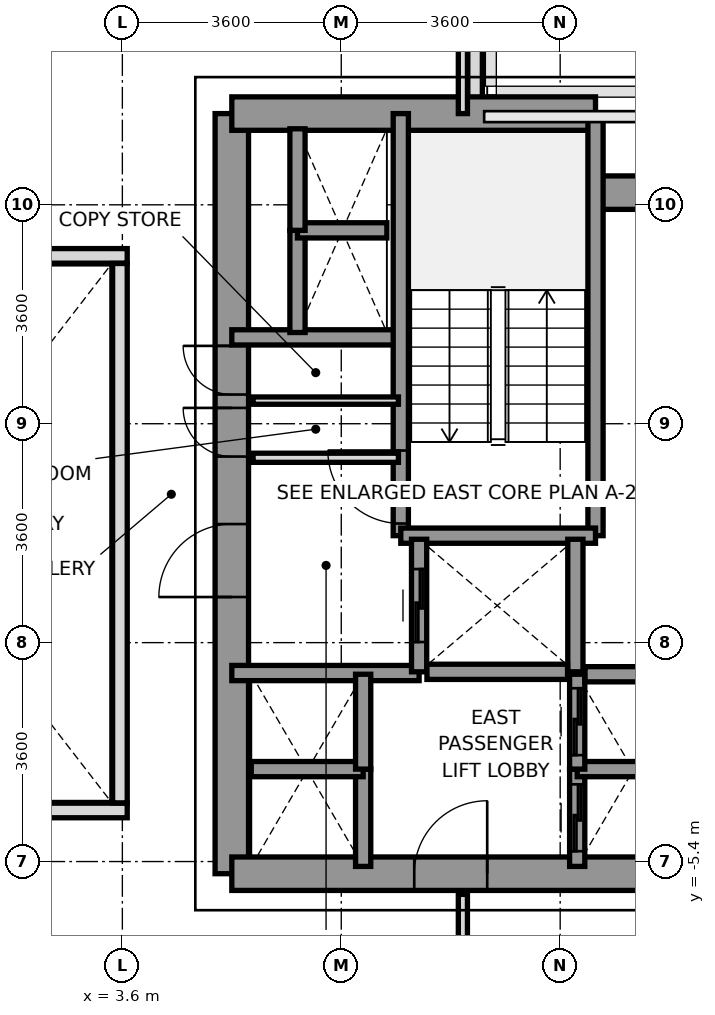
"""IFC4 building model, lengths in metres.
Left out: names, types, materials, properties, quantities, classifications, styles, units other than length and angle.
Written with IfcOpenShell. Run it as: python <this file> out.ifc"""

import sys

from ifc_helpers import new_model, si_unit, direction, frame, frame_2d, origin, place, context, subcontext, project, spatial, rectangle, extrude, source, transform, mapped, element, fill, save


model = new_model("IFC4")
c1 = context("Model", 3, precision=1e-05, world=origin(), true_north=direction((0.0, 1.0)))
c2 = subcontext(c1, "Body", "Model", "MODEL_VIEW")
j1 = project(units=[si_unit("LENGTHUNIT", "METRE"), si_unit("PLANEANGLEUNIT", "RADIAN")], contexts=[c1])
p1 = place(None, origin())
s1 = spatial("IfcSite", under=j1, at=p1, CompositionType="ELEMENT")
p2 = place(p1, origin())
s2 = spatial("IfcBuilding", under=s1, at=p2, CompositionType="ELEMENT")
p3 = place(p2, frame((0.0, 0.0, 51.0)))
s3 = spatial("IfcBuildingStorey", under=s2, at=p3, CompositionType="ELEMENT", Elevation=51.0)
p4 = place(p3, frame((9.4, 8.397, 0.0), z_axis=(0.0, 0.0, 1.0), x_axis=(0.0, -1.0, 0.0)))
e1 = element("IfcWall", 1, at=p4, inside=s3, PredefinedType="PARAPET", context=c2, shape_type="SweptSolid", body=[
    extrude(rectangle(XDim=1.444, YDim=0.24, at=frame_2d((0.722, 0.0))), origin(), (0.0, 0.0, 1.0), 1.15),
])
p5 = place(p3, frame((5.4, -5.6, 0.0), z_axis=(0.0, 0.0, 1.0), x_axis=(0.0, 1.0, 0.0)))
e2 = element("IfcWall", 2, at=p5, inside=s3, PredefinedType="SHEAR", context=c2, shape_type="SweptSolid", body=[
    extrude(rectangle(XDim=12.5, YDim=0.55, at=frame_2d((6.25, 0.0))), origin(), (0.0, 0.0, 1.0), 3.2),
])
p6 = place(p5, frame((4.55, 0.0, 0.0)))
e3 = element("IfcOpeningElement", 3, at=p6, cuts=e2, PredefinedType="OPENING", context=c2, shape_type="SweptSolid", body=[
    extrude(rectangle(XDim=1.2, YDim=2.2, at=frame_2d((0.6, 1.1))), frame((0.0, 0.285, 0.0), z_axis=(0.0, -1.0, 0.0), x_axis=(1.0, 0.0, 0.0)), (0.0, 0.0, 1.0), 0.57),
])
p7 = place(p5, frame((6.86, 0.0, 0.0)))
e4 = element("IfcOpeningElement", 4, at=p7, cuts=e2, PredefinedType="OPENING", context=c2, shape_type="SweptSolid", body=[
    extrude(rectangle(XDim=0.8, YDim=2.1, at=frame_2d((0.4, 1.05))), frame((0.0, 0.285, 0.0), z_axis=(0.0, -1.0, 0.0), x_axis=(1.0, 0.0, 0.0)), (0.0, 0.0, 1.0), 0.57),
])
p8 = place(p5, frame((7.88, 0.0, 0.0)))
e5 = element("IfcOpeningElement", 5, at=p8, cuts=e2, PredefinedType="OPENING", context=c2, shape_type="SweptSolid", body=[
    extrude(rectangle(XDim=0.8, YDim=2.1, at=frame_2d((0.4, 1.05))), frame((0.0, 0.285, 0.0), z_axis=(0.0, -1.0, 0.0), x_axis=(1.0, 0.0, 0.0)), (0.0, 0.0, 1.0), 0.57),
])
p9 = place(p3, frame((5.4, 6.9, 0.0), z_axis=(0.0, 0.0, 1.0), x_axis=(1.0, 0.0, 0.0)))
e6 = element("IfcWall", 6, at=p9, inside=s3, PredefinedType="SHEAR", context=c2, shape_type="SweptSolid", body=[
    extrude(rectangle(XDim=5.981, YDim=0.55, at=frame_2d((2.991, 0.0))), origin(), (0.0, 0.0, 1.0), 3.2),
])
p10 = place(p3, frame((11.381, 5.6, 0.0), z_axis=(0.0, 0.0, 1.0), x_axis=(1.0, 0.0, 0.0)))
e7 = element("IfcWall", 7, at=p10, inside=s3, PredefinedType="SHEAR", context=c2, shape_type="SweptSolid", body=[
    extrude(rectangle(XDim=1.819, YDim=0.55, at=frame_2d((0.909, 0.0))), origin(), (0.0, 0.0, 1.0), 3.2),
])
p11 = place(p3, frame((5.4, -5.6, 0.0), z_axis=(0.0, 0.0, 1.0), x_axis=(1.0, 0.0, 0.0)))
e8 = element("IfcWall", 8, at=p11, inside=s3, PredefinedType="SHEAR", context=c2, shape_type="SweptSolid", body=[
    extrude(rectangle(XDim=7.8, YDim=0.55, at=frame_2d((3.9, 0.0))), origin(), (0.0, 0.0, 1.0), 3.2),
])
p12 = place(p11, frame((3.0, 0.0, 0.0)))
e9 = element("IfcOpeningElement", 9, at=p12, cuts=e8, PredefinedType="OPENING", context=c2, shape_type="SweptSolid", body=[
    extrude(rectangle(XDim=1.2, YDim=2.2, at=frame_2d((0.6, 1.1))), frame((0.0, 0.285, 0.0), z_axis=(0.0, -1.0, 0.0), x_axis=(1.0, 0.0, 0.0)), (0.0, 0.0, 1.0), 0.57),
])
p13 = place(p3, frame((5.4, 3.22, 0.0), z_axis=(0.0, 0.0, 1.0), x_axis=(1.0, 0.0, 0.0)))
e10 = element("IfcWall", 10, at=p13, inside=s3, PredefinedType="SOLIDWALL", context=c2, shape_type="SweptSolid", body=[
    extrude(rectangle(XDim=2.78, YDim=0.25, at=frame_2d((1.39, 0.0))), origin(), (0.0, 0.0, 1.0), 3.2),
])
p14 = place(p3, frame((5.4, -2.3, 0.0), z_axis=(0.0, 0.0, 1.0), x_axis=(1.0, 0.0, 0.0)))
e11 = element("IfcWall", 11, at=p14, inside=s3, PredefinedType="SOLIDWALL", context=c2, shape_type="SweptSolid", body=[
    extrude(rectangle(XDim=3.08, YDim=0.25, at=frame_2d((1.54, 0.0))), origin(), (0.0, 0.0, 1.0), 3.2),
])
p15 = place(p3, frame((8.179, -0.041, 0.0), z_axis=(0.0, 0.0, 1.0), x_axis=(0.0, 1.0, 0.0)))
e12 = element("IfcWall", 12, at=p15, inside=s3, PredefinedType="SOLIDWALL", context=c2, shape_type="SweptSolid", body=[
    extrude(rectangle(XDim=6.941, YDim=0.25, at=frame_2d((3.47, 0.0))), origin(), (0.0, 0.0, 1.0), 3.2),
])
p16 = place(p15, frame((0.2, 0.0, 0.0)))
e13 = element("IfcOpeningElement", 13, at=p16, cuts=e12, PredefinedType="OPENING", context=c2, shape_type="SweptSolid", body=[
    extrude(rectangle(XDim=1.2, YDim=2.2, at=frame_2d((0.6, 1.1))), frame((0.0, 0.135, 0.0), z_axis=(0.0, -1.0, 0.0), x_axis=(1.0, 0.0, 0.0)), (0.0, 0.0, 1.0), 0.27),
])
p17 = place(p3, frame((11.381, -0.041, 0.0), z_axis=(0.0, 0.0, 1.0), x_axis=(0.0, 1.0, 0.0)))
e14 = element("IfcWall", 14, at=p17, inside=s3, PredefinedType="SOLIDWALL", context=c2, shape_type="SweptSolid", body=[
    extrude(rectangle(XDim=6.941, YDim=0.25, at=frame_2d((3.47, 0.0))), origin(), (0.0, 0.0, 1.0), 3.2),
])
p18 = place(p3, frame((8.179, -0.041, 0.0), z_axis=(0.0, 0.0, 1.0), x_axis=(1.0, 0.0, 0.0)))
e15 = element("IfcWall", 15, at=p18, inside=s3, PredefinedType="SOLIDWALL", context=c2, shape_type="SweptSolid", body=[
    extrude(rectangle(XDim=3.202, YDim=0.25, at=frame_2d((1.601, 0.0))), origin(), (0.0, 0.0, 1.0), 3.2),
])
p19 = place(p3, frame((8.48, -2.28, 0.0), z_axis=(0.0, 0.0, 1.0), x_axis=(0.0, 1.0, 0.0)))
e16 = element("IfcWall", 16, at=p19, inside=s3, PredefinedType="SOLIDWALL", context=c2, shape_type="SweptSolid", body=[
    extrude(rectangle(XDim=2.18, YDim=0.25, at=frame_2d((1.09, 0.0))), origin(), (0.0, 0.0, 1.0), 3.2),
])
p20 = place(p19, frame((0.49, 0.0, 0.0)))
e17 = element("IfcOpeningElement", 17, at=p20, cuts=e16, PredefinedType="OPENING", context=c2, shape_type="SweptSolid", body=[
    extrude(rectangle(XDim=1.2, YDim=2.2, at=frame_2d((0.6, 1.1))), frame((0.0, 0.135, 0.0), z_axis=(0.0, -1.0, 0.0), x_axis=(1.0, 0.0, 0.0)), (0.0, 0.0, 1.0), 0.27),
])
p21 = place(p3, frame((11.05, -2.28, 0.0), z_axis=(0.0, 0.0, 1.0), x_axis=(0.0, 1.0, 0.0)))
e18 = element("IfcWall", 18, at=p21, inside=s3, PredefinedType="SOLIDWALL", context=c2, shape_type="SweptSolid", body=[
    extrude(rectangle(XDim=2.18, YDim=0.25, at=frame_2d((1.09, 0.0))), origin(), (0.0, 0.0, 1.0), 3.2),
])
p22 = place(p3, frame((8.609, -2.28, 0.0), z_axis=(0.0, 0.0, 1.0), x_axis=(1.0, 0.0, 0.0)))
e19 = element("IfcWall", 19, at=p22, inside=s3, PredefinedType="SOLIDWALL", context=c2, shape_type="SweptSolid", body=[
    extrude(rectangle(XDim=2.312, YDim=0.25, at=frame_2d((1.156, 0.0))), origin(), (0.0, 0.0, 1.0), 3.2),
])
p23 = place(p3, frame((11.08, -5.48, 0.0), z_axis=(0.0, 0.0, 1.0), x_axis=(0.0, 1.0, 0.0)))
e20 = element("IfcWall", 20, at=p23, inside=s3, PredefinedType="SOLIDWALL", context=c2, shape_type="SweptSolid", body=[
    extrude(rectangle(XDim=1.6, YDim=0.25, at=frame_2d((0.8, 0.0))), origin(), (0.0, 0.0, 1.0), 3.2),
])
p24 = place(p23, frame((0.25, 0.0, 0.0)))
e21 = element("IfcOpeningElement", 21, at=p24, cuts=e20, PredefinedType="OPENING", context=c2, shape_type="SweptSolid", body=[
    extrude(rectangle(XDim=1.1, YDim=2.2, at=frame_2d((0.55, 1.1))), frame((0.0, 0.135, 0.0), z_axis=(0.0, -1.0, 0.0), x_axis=(1.0, 0.0, 0.0)), (0.0, 0.0, 1.0), 0.27),
])
p25 = place(p3, frame((11.08, -3.88, 0.0), z_axis=(0.0, 0.0, 1.0), x_axis=(1.0, 0.0, 0.0)))
e22 = element("IfcWall", 22, at=p25, inside=s3, PredefinedType="SOLIDWALL", context=c2, shape_type="SweptSolid", body=[
    extrude(rectangle(XDim=1.84, YDim=0.25, at=frame_2d((0.92, 0.0))), origin(), (0.0, 0.0, 1.0), 3.2),
])
p26 = place(p3, frame((11.08, -3.88, 0.0), z_axis=(0.0, 0.0, 1.0), x_axis=(0.0, 1.0, 0.0)))
e23 = element("IfcWall", 23, at=p26, inside=s3, PredefinedType="SOLIDWALL", context=c2, shape_type="SweptSolid", body=[
    extrude(rectangle(XDim=1.56, YDim=0.25, at=frame_2d((0.78, 0.0))), origin(), (0.0, 0.0, 1.0), 3.2),
])
p27 = place(p26, frame((0.23, 0.0, 0.0)))
e24 = element("IfcOpeningElement", 24, at=p27, cuts=e23, PredefinedType="OPENING", context=c2, shape_type="SweptSolid", body=[
    extrude(rectangle(XDim=1.1, YDim=2.2, at=frame_2d((0.55, 1.1))), frame((0.0, 0.135, 0.0), z_axis=(0.0, -1.0, 0.0), x_axis=(1.0, 0.0, 0.0)), (0.0, 0.0, 1.0), 0.27),
])
p28 = place(p3, frame((11.209, -2.32, 0.0), z_axis=(0.0, 0.0, 1.0), x_axis=(1.0, 0.0, 0.0)))
e25 = element("IfcWall", 25, at=p28, inside=s3, PredefinedType="SOLIDWALL", context=c2, shape_type="SweptSolid", body=[
    extrude(rectangle(XDim=1.582, YDim=0.25, at=frame_2d((0.791, 0.0))), origin(), (0.0, 0.0, 1.0), 3.2),
])
p29 = place(p3, frame((7.56, -5.48, 0.0), z_axis=(0.0, 0.0, 1.0), x_axis=(0.0, 1.0, 0.0)))
e26 = element("IfcWall", 26, at=p29, inside=s3, PredefinedType="SOLIDWALL", context=c2, shape_type="SweptSolid", body=[
    extrude(rectangle(XDim=1.6, YDim=0.25, at=frame_2d((0.8, 0.0))), origin(), (0.0, 0.0, 1.0), 3.2),
])
p30 = place(p3, frame((5.72, -3.88, 0.0), z_axis=(0.0, 0.0, 1.0), x_axis=(1.0, 0.0, 0.0)))
e27 = element("IfcWall", 27, at=p30, inside=s3, PredefinedType="SOLIDWALL", context=c2, shape_type="SweptSolid", body=[
    extrude(rectangle(XDim=1.84, YDim=0.25, at=frame_2d((0.92, 0.0))), origin(), (0.0, 0.0, 1.0), 3.2),
])
p31 = place(p3, frame((7.56, -3.88, 0.0), z_axis=(0.0, 0.0, 1.0), x_axis=(0.0, 1.0, 0.0)))
e28 = element("IfcWall", 28, at=p31, inside=s3, PredefinedType="SOLIDWALL", context=c2, shape_type="SweptSolid", body=[
    extrude(rectangle(XDim=1.56, YDim=0.25, at=frame_2d((0.78, 0.0))), origin(), (0.0, 0.0, 1.0), 3.2),
])
p32 = place(p3, frame((6.48, 3.3, 0.0), z_axis=(0.0, 0.0, 1.0), x_axis=(0.0, 1.0, 0.0)))
e29 = element("IfcWall", 29, at=p32, inside=s3, PredefinedType="SOLIDWALL", context=c2, shape_type="SweptSolid", body=[
    extrude(rectangle(XDim=1.68, YDim=0.25, at=frame_2d((0.84, 0.0))), origin(), (0.0, 0.0, 1.0), 3.2),
])
p33 = place(p3, frame((6.48, 4.98, 0.0), z_axis=(0.0, 0.0, 1.0), x_axis=(1.0, 0.0, 0.0)))
e30 = element("IfcWall", 30, at=p33, inside=s3, PredefinedType="SOLIDWALL", context=c2, shape_type="SweptSolid", body=[
    extrude(rectangle(XDim=1.47, YDim=0.25, at=frame_2d((0.735, 0.0))), origin(), (0.0, 0.0, 1.0), 3.2),
])
p34 = place(p3, frame((6.48, 4.98, 0.0), z_axis=(0.0, 0.0, 1.0), x_axis=(0.0, 1.0, 0.0)))
e31 = element("IfcWall", 31, at=p34, inside=s3, PredefinedType="SOLIDWALL", context=c2, shape_type="SweptSolid", body=[
    extrude(rectangle(XDim=1.67, YDim=0.25, at=frame_2d((0.835, 0.0))), origin(), (0.0, 0.0, 1.0), 3.2),
])
p35 = place(p3, frame((5.75, 1.24, 0.0), z_axis=(0.0, 0.0, 1.0), x_axis=(1.0, 0.0, 0.0)))
e32 = element("IfcWall", 32, at=p35, inside=s3, PredefinedType="PARTITIONING", context=c2, shape_type="SweptSolid", body=[
    extrude(rectangle(XDim=2.39, YDim=0.15, at=frame_2d((1.195, 0.0))), origin(), (0.0, 0.0, 1.0), 2.3),
])
p36 = place(p3, frame((5.75, 2.18, 0.0), z_axis=(0.0, 0.0, 1.0), x_axis=(1.0, 0.0, 0.0)))
e33 = element("IfcWall", 33, at=p36, inside=s3, PredefinedType="PARTITIONING", context=c2, shape_type="SweptSolid", body=[
    extrude(rectangle(XDim=2.39, YDim=0.12, at=frame_2d((1.195, 0.0))), origin(), (0.0, 0.0, 1.0), 2.3),
])
p37 = place(p3, frame((9.2, 6.9, 0.0), z_axis=(0.0, 0.0, 1.0), x_axis=(0.0, 1.0, 0.0)))
e34 = element("IfcWall", 34, at=p37, inside=s3, PredefinedType="PARTITIONING", context=c2, shape_type="SweptSolid", body=[
    extrude(rectangle(XDim=8.78, YDim=0.15, at=frame_2d((4.39, 0.0))), origin(), (0.0, 0.0, 1.0), 2.65),
])
p38 = place(p3, frame((9.2, -15.68, 0.0), z_axis=(0.0, 0.0, 1.0), x_axis=(0.0, 1.0, 0.0)))
e35 = element("IfcWall", 35, at=p38, inside=s3, PredefinedType="PARTITIONING", context=c2, shape_type="SweptSolid", body=[
    extrude(rectangle(XDim=9.74, YDim=0.15, at=frame_2d((4.87, 0.0))), origin(), (0.0, 0.0, 1.0), 2.65),
])
for number, where, z_axis, x_axis in (
    (36, (-3.68, -4.56, 0.0), (0.0, 0.0, 1.0), (1.0, 0.0, 0.0)),
    (37, (-3.68, 4.56, 0.0), (0.0, 0.0, 1.0), (1.0, 0.0, 0.0)),
):
    element("IfcWall", number, at=place(p3, frame(where, z_axis=z_axis, x_axis=x_axis)), inside=s3, PredefinedType="PARAPET", context=c2, shape_type="SweptSolid", body=[
        extrude(rectangle(XDim=7.36, YDim=0.24, at=frame_2d((3.68, 0.0))), origin(), (0.0, 0.0, 1.0), 1.15),
    ])
p39 = place(p3, frame((3.56, -4.435, 0.0), z_axis=(0.0, 0.0, 1.0), x_axis=(0.0, 1.0, 0.0)))
e38 = element("IfcWall", 38, at=p39, inside=s3, PredefinedType="PARAPET", context=c2, shape_type="SweptSolid", body=[
    extrude(rectangle(XDim=8.87, YDim=0.24, at=frame_2d((4.435, 0.0))), origin(), (0.0, 0.0, 1.0), 1.15),
])
m1 = source(origin(), c2, "Body", "SweptSolid", [
    extrude(rectangle(XDim=1.2, YDim=2.2, at=frame_2d((0.6, 1.1))), frame((0.0, 0.025, 0.0), z_axis=(0.0, -1.0, 0.0), x_axis=(1.0, 0.0, 0.0)), (0.0, 0.0, 1.0), 0.05),
])
p40 = place(p16, origin())
e39 = element("IfcDoor", 39, at=p40, inside=s3, OperationType="SINGLE_SWING_RIGHT", PredefinedType="DOOR", context=c2, shape_type="MappedRepresentation", body=[
    mapped(m1, transform((0.0, 0.0, 0.0), x_axis=(1.0, 0.0, 0.0), y_axis=(0.0, 1.0, 0.0), z_axis=(0.0, 0.0, 1.0), scale=1.0)),
])
fill(e13, e39)
p41 = place(p6, origin())
e40 = element("IfcDoor", 40, at=p41, inside=s3, OperationType="SINGLE_SWING_LEFT", PredefinedType="DOOR", context=c2, shape_type="MappedRepresentation", body=[
    mapped(m1, transform((0.0, 0.0, 0.0), x_axis=(1.0, 0.0, 0.0), y_axis=(0.0, 1.0, 0.0), z_axis=(0.0, 0.0, 1.0), scale=1.0)),
])
fill(e3, e40)
p42 = place(p12, origin())
e41 = element("IfcDoor", 41, at=p42, inside=s3, OperationType="SINGLE_SWING_RIGHT", PredefinedType="DOOR", context=c2, shape_type="MappedRepresentation", body=[
    mapped(m1, transform((0.0, 0.0, 0.0), x_axis=(1.0, 0.0, 0.0), y_axis=(0.0, 1.0, 0.0), z_axis=(0.0, 0.0, 1.0), scale=1.0)),
])
fill(e9, e41)
m2 = source(origin(), c2, "Body", "SweptSolid", [
    extrude(rectangle(XDim=0.8, YDim=2.1, at=frame_2d((0.4, 1.05))), frame((0.0, 0.025, 0.0), z_axis=(0.0, -1.0, 0.0), x_axis=(1.0, 0.0, 0.0)), (0.0, 0.0, 1.0), 0.05),
])
p43 = place(p7, origin())
e42 = element("IfcDoor", 42, at=p43, inside=s3, OperationType="SINGLE_SWING_RIGHT", PredefinedType="DOOR", context=c2, shape_type="MappedRepresentation", body=[
    mapped(m2, transform((0.0, 0.0, 0.0), x_axis=(1.0, 0.0, 0.0), y_axis=(0.0, 1.0, 0.0), z_axis=(0.0, 0.0, 1.0), scale=1.0)),
])
fill(e4, e42)
p44 = place(p8, origin())
e43 = element("IfcDoor", 43, at=p44, inside=s3, OperationType="SINGLE_SWING_RIGHT", PredefinedType="DOOR", context=c2, shape_type="MappedRepresentation", body=[
    mapped(m2, transform((0.0, 0.0, 0.0), x_axis=(1.0, 0.0, 0.0), y_axis=(0.0, 1.0, 0.0), z_axis=(0.0, 0.0, 1.0), scale=1.0)),
])
fill(e5, e43)
p45 = place(p20, origin())
e44 = element("IfcDoor", 44, at=p45, inside=s3, OperationType="SLIDING_TO_RIGHT", PredefinedType="DOOR", context=c2, shape_type="MappedRepresentation", body=[
    mapped(m1, transform((0.0, 0.0, 0.0), x_axis=(1.0, 0.0, 0.0), y_axis=(0.0, 1.0, 0.0), z_axis=(0.0, 0.0, 1.0), scale=1.0)),
])
fill(e17, e44)
m3 = source(origin(), c2, "Body", "SweptSolid", [
    extrude(rectangle(XDim=1.1, YDim=2.2, at=frame_2d((0.55, 1.1))), frame((0.0, 0.025, 0.0), z_axis=(0.0, -1.0, 0.0), x_axis=(1.0, 0.0, 0.0)), (0.0, 0.0, 1.0), 0.05),
])
p46 = place(p24, origin())
e45 = element("IfcDoor", 45, at=p46, inside=s3, OperationType="SLIDING_TO_LEFT", PredefinedType="DOOR", context=c2, shape_type="MappedRepresentation", body=[
    mapped(m3, transform((0.0, 0.0, 0.0), x_axis=(1.0, 0.0, 0.0), y_axis=(0.0, 1.0, 0.0), z_axis=(0.0, 0.0, 1.0), scale=1.0)),
])
fill(e21, e45)
p47 = place(p27, origin())
e46 = element("IfcDoor", 46, at=p47, inside=s3, OperationType="SLIDING_TO_LEFT", PredefinedType="DOOR", context=c2, shape_type="MappedRepresentation", body=[
    mapped(m3, transform((0.0, 0.0, 0.0), x_axis=(1.0, 0.0, 0.0), y_axis=(0.0, 1.0, 0.0), z_axis=(0.0, 0.0, 1.0), scale=1.0)),
])
fill(e24, e46)
save(model, sys.argv[1])
